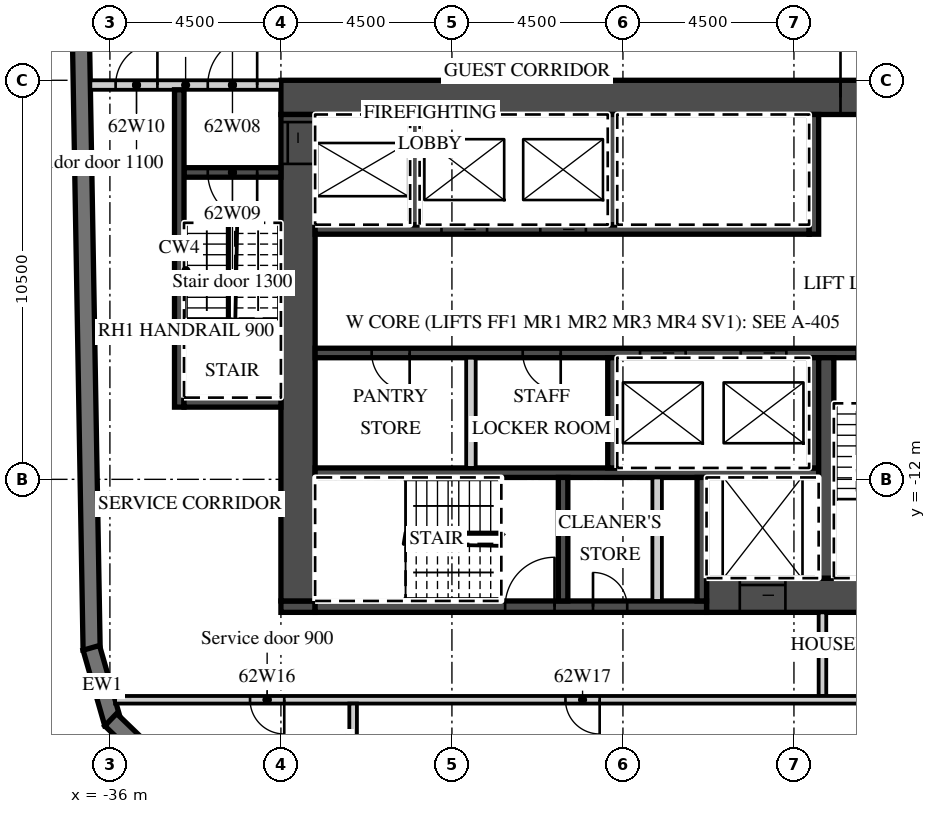
"""IFC4 building model, lengths in metres.
Left out: names, types, materials, properties, quantities, classifications, styles, units other than length and angle.
Written with IfcOpenShell. Run it as: python <this file> out.ifc"""

import sys

from ifc_helpers import new_model, si_unit, direction, frame, frame_2d, origin, place, context, subcontext, project, spatial, polyline, rectangle, outline, extrude, element, fill, save


model = new_model("IFC4")
c1 = context("Model", 3, precision=1e-05, world=origin(), true_north=direction((0.0, 1.0)))
c2 = subcontext(c1, "Body", "Model", "MODEL_VIEW")
j1 = project(units=[si_unit("LENGTHUNIT", "METRE"), si_unit("PLANEANGLEUNIT", "RADIAN")], contexts=[c1])
p1 = place(None, origin())
s1 = spatial("IfcSite", under=j1, at=p1, CompositionType="ELEMENT")
p2 = place(p1, origin())
s2 = spatial("IfcBuilding", under=s1, at=p2, CompositionType="ELEMENT")
p3 = place(p2, frame((0.0, 0.0, 250.7)))
s3 = spatial("IfcBuildingStorey", under=s2, at=p3, CompositionType="ELEMENT", Elevation=250.7)
p4 = place(p3, frame((-37.057, 16.503, 0.0), z_axis=(0.0, 0.0, 1.0), x_axis=(0.017452279857, -0.999847697366, 0.0)))
e1 = element("IfcWall", 1, at=p4, inside=s3, PredefinedType="SOLIDWALL", context=c2, shape_type="SweptSolid", body=[
    extrude(rectangle(XDim=33.0, YDim=0.45, at=frame_2d((16.5, 0.0))), origin(), (0.0, 0.0, 1.0), 3.02),
])
p5 = place(p3, frame((-36.49, -16.434, 0.0), z_axis=(0.0, 0.0, 1.0), x_axis=(0.275577603096, -0.961278827745, 0.0)))
e2 = element("IfcWall", 2, at=p5, inside=s3, PredefinedType="SOLIDWALL", context=c2, shape_type="SweptSolid", body=[
    extrude(outline(polyline([(0.0, -0.225), (2.071, -0.225), (1.95, 0.225), (0.121, 0.225), (0.0, -0.225)])), origin(), (0.0, 0.0, 1.0), 3.02),
])
p6 = place(p3, frame((-35.979, -18.324, 0.0), z_axis=(0.0, 0.0, 1.0), x_axis=(0.719320193998, -0.694678672846, 0.0)))
e3 = element("IfcWall", 3, at=p6, inside=s3, PredefinedType="SOLIDWALL", context=c2, shape_type="SweptSolid", body=[
    extrude(outline(polyline([(0.0, -0.225), (2.071, -0.225), (1.95, 0.225), (0.121, 0.225), (0.0, -0.225)])), origin(), (0.0, 0.0, 1.0), 3.02),
])
p7 = place(p3, frame((-31.5, -1.95, 0.0), z_axis=(0.0, 0.0, 1.0), x_axis=(1.0, 0.0, 0.0)))
e4 = element("IfcWall", 4, at=p7, inside=s3, PredefinedType="SHEAR", context=c2, shape_type="SweptSolid", body=[
    extrude(rectangle(XDim=18.0, YDim=0.9, at=frame_2d((9.0, 0.0))), origin(), (0.0, 0.0, 1.0), 3.02),
])
p8 = place(p7, frame((14.725, 0.0, 0.0)))
e5 = element("IfcOpeningElement", 5, at=p8, cuts=e4, PredefinedType="OPENING", context=c2, shape_type="SweptSolid", body=[
    extrude(rectangle(XDim=1.8, YDim=2.1, at=frame_2d((0.9, 1.05))), frame((0.0, 0.46, 0.0), z_axis=(0.0, -1.0, 0.0), x_axis=(1.0, 0.0, 0.0)), (0.0, 0.0, 1.0), 0.92),
])
p9 = place(p3, frame((-20.3, -15.05, 0.0), z_axis=(0.0, 0.0, 1.0), x_axis=(1.0, 0.0, 0.0)))
e6 = element("IfcWall", 6, at=p9, inside=s3, PredefinedType="SHEAR", context=c2, shape_type="SweptSolid", body=[
    extrude(rectangle(XDim=6.8, YDim=0.9, at=frame_2d((3.4, 0.0))), origin(), (0.0, 0.0, 1.0), 3.02),
])
p10 = place(p9, frame((0.875, 0.0, 0.0)))
e7 = element("IfcOpeningElement", 7, at=p10, cuts=e6, PredefinedType="OPENING", context=c2, shape_type="SweptSolid", body=[
    extrude(rectangle(XDim=1.2, YDim=2.1, at=frame_2d((0.6, 1.05))), frame((0.0, 0.46, 0.0), z_axis=(0.0, -1.0, 0.0), x_axis=(1.0, 0.0, 0.0)), (0.0, 0.0, 1.0), 0.92),
])
p11 = place(p3, frame((-31.5, -15.35, 0.0), z_axis=(0.0, 0.0, 1.0), x_axis=(1.0, 0.0, 0.0)))
e8 = element("IfcWall", 8, at=p11, inside=s3, PredefinedType="SHEAR", context=c2, shape_type="SweptSolid", body=[
    extrude(rectangle(XDim=0.9, YDim=0.3, at=frame_2d((0.45, 0.0))), origin(), (0.0, 0.0, 1.0), 3.02),
])
p12 = place(p3, frame((-30.6, -15.35, 0.0), z_axis=(0.0, 0.0, 1.0), x_axis=(1.0, 0.0, 0.0)))
e9 = element("IfcWall", 9, at=p12, inside=s3, PredefinedType="SHEAR", context=c2, shape_type="SweptSolid", body=[
    extrude(rectangle(XDim=10.3, YDim=0.3, at=frame_2d((5.15, 0.0))), origin(), (0.0, 0.0, 1.0), 3.02),
])
p13 = place(p12, frame((5.0, 0.0, 0.0)))
e10 = element("IfcOpeningElement", 10, at=p13, cuts=e9, PredefinedType="OPENING", context=c2, shape_type="SweptSolid", body=[
    extrude(rectangle(XDim=1.3, YDim=2.1, at=frame_2d((0.65, 1.05))), frame((0.0, 0.16, 0.0), z_axis=(0.0, -1.0, 0.0), x_axis=(1.0, 0.0, 0.0)), (0.0, 0.0, 1.0), 0.32),
])
p14 = place(p12, frame((7.312, 0.0, 0.0)))
e11 = element("IfcOpeningElement", 11, at=p14, cuts=e9, PredefinedType="OPENING", context=c2, shape_type="SweptSolid", body=[
    extrude(rectangle(XDim=0.9, YDim=2.1, at=frame_2d((0.45, 1.05))), frame((0.0, 0.16, 0.0), z_axis=(0.0, -1.0, 0.0), x_axis=(1.0, 0.0, 0.0)), (0.0, 0.0, 1.0), 0.32),
])
p15 = place(p3, frame((-31.05, -15.2, 0.0), z_axis=(0.0, 0.0, 1.0), x_axis=(0.0, 1.0, 0.0)))
e12 = element("IfcWall", 12, at=p15, inside=s3, PredefinedType="SHEAR", context=c2, shape_type="SweptSolid", body=[
    extrude(rectangle(XDim=12.8, YDim=0.9, at=frame_2d((6.4, 0.0))), origin(), (0.0, 0.0, 1.0), 3.02),
])
p16 = place(p15, frame((11.5, 0.0, 0.0)))
e13 = element("IfcOpeningElement", 13, at=p16, cuts=e12, PredefinedType="OPENING", context=c2, shape_type="SweptSolid", body=[
    extrude(rectangle(XDim=1.1, YDim=2.1, at=frame_2d((0.55, 1.05))), frame((0.0, 0.46, 0.0), z_axis=(0.0, -1.0, 0.0), x_axis=(1.0, 0.0, 0.0)), (0.0, 0.0, 1.0), 0.92),
])
p17 = place(p3, frame((-30.6, -5.425, 0.0), z_axis=(0.0, 0.0, 1.0), x_axis=(1.0, 0.0, 0.0)))
e14 = element("IfcWall", 14, at=p17, inside=s3, PredefinedType="SHEAR", context=c2, shape_type="SweptSolid", body=[
    extrude(rectangle(XDim=13.0, YDim=0.25, at=frame_2d((6.5, 0.0))), origin(), (0.0, 0.0, 1.0), 3.02),
])
p18 = place(p17, frame((3.325, 0.0, 0.0)))
e15 = element("IfcOpeningElement", 15, at=p18, cuts=e14, PredefinedType="OPENING", context=c2, shape_type="SweptSolid", body=[
    extrude(rectangle(XDim=1.2, YDim=2.1, at=frame_2d((0.6, 1.05))), frame((0.0, 0.135, 0.0), z_axis=(0.0, -1.0, 0.0), x_axis=(1.0, 0.0, 0.0)), (0.0, 0.0, 1.0), 0.27),
])
p19 = place(p17, frame((5.925, 0.0, 0.0)))
e16 = element("IfcOpeningElement", 16, at=p19, cuts=e14, PredefinedType="OPENING", context=c2, shape_type="SweptSolid", body=[
    extrude(rectangle(XDim=1.2, YDim=2.1, at=frame_2d((0.6, 1.05))), frame((0.0, 0.135, 0.0), z_axis=(0.0, -1.0, 0.0), x_axis=(1.0, 0.0, 0.0)), (0.0, 0.0, 1.0), 0.27),
])
p20 = place(p3, frame((-17.475, -5.55, 0.0), z_axis=(0.0, 0.0, 1.0), x_axis=(0.0, 1.0, 0.0)))
e17 = element("IfcWall", 17, at=p20, inside=s3, PredefinedType="SHEAR", context=c2, shape_type="SweptSolid", body=[
    extrude(rectangle(XDim=3.15, YDim=0.25, at=frame_2d((1.575, 0.0))), origin(), (0.0, 0.0, 1.0), 3.02),
])
for number, where, z_axis, x_axis in (
    (18, (-27.975, -5.3, 0.0), (0.0, 0.0, 1.0), (0.0, 1.0, 0.0)),
    (19, (-22.775, -5.3, 0.0), (0.0, 0.0, 1.0), (0.0, 1.0, 0.0)),
):
    element("IfcWall", number, at=place(p3, frame(where, z_axis=z_axis, x_axis=x_axis)), inside=s3, PredefinedType="SHEAR", context=c2, shape_type="SweptSolid", body=[
        extrude(rectangle(XDim=2.9, YDim=0.25, at=frame_2d((1.45, 0.0))), origin(), (0.0, 0.0, 1.0), 3.02),
    ])
p21 = place(p3, frame((-30.6, -8.675, 0.0), z_axis=(0.0, 0.0, 1.0), x_axis=(1.0, 0.0, 0.0)))
e20 = element("IfcWall", 20, at=p21, inside=s3, PredefinedType="SHEAR", context=c2, shape_type="SweptSolid", body=[
    extrude(rectangle(XDim=16.2, YDim=0.25, at=frame_2d((8.1, 0.0))), origin(), (0.0, 0.0, 1.0), 3.02),
])
p22 = place(p21, frame((8.55, 0.0, 0.0)))
e21 = element("IfcOpeningElement", 21, at=p22, cuts=e20, PredefinedType="OPENING", context=c2, shape_type="SweptSolid", body=[
    extrude(rectangle(XDim=1.2, YDim=2.1, at=frame_2d((0.6, 1.05))), frame((0.0, 0.135, 0.0), z_axis=(0.0, -1.0, 0.0), x_axis=(1.0, 0.0, 0.0)), (0.0, 0.0, 1.0), 0.27),
])
p23 = place(p21, frame((11.2, 0.0, 0.0)))
e22 = element("IfcOpeningElement", 22, at=p23, cuts=e20, PredefinedType="OPENING", context=c2, shape_type="SweptSolid", body=[
    extrude(rectangle(XDim=1.2, YDim=2.1, at=frame_2d((0.6, 1.05))), frame((0.0, 0.135, 0.0), z_axis=(0.0, -1.0, 0.0), x_axis=(1.0, 0.0, 0.0)), (0.0, 0.0, 1.0), 0.27),
])
p24 = place(p21, frame((14.25, 0.0, 0.0)))
e23 = element("IfcOpeningElement", 23, at=p24, cuts=e20, PredefinedType="OPENING", context=c2, shape_type="SweptSolid", body=[
    extrude(rectangle(XDim=1.3, YDim=2.1, at=frame_2d((0.65, 1.05))), frame((0.0, 0.135, 0.0), z_axis=(0.0, -1.0, 0.0), x_axis=(1.0, 0.0, 0.0)), (0.0, 0.0, 1.0), 0.27),
])
p25 = place(p21, frame((1.488, 0.0, 0.0)))
e24 = element("IfcOpeningElement", 24, at=p25, cuts=e20, PredefinedType="OPENING", context=c2, shape_type="SweptSolid", body=[
    extrude(rectangle(XDim=1.0, YDim=2.1, at=frame_2d((0.5, 1.05))), frame((0.0, 0.135, 0.0), z_axis=(0.0, -1.0, 0.0), x_axis=(1.0, 0.0, 0.0)), (0.0, 0.0, 1.0), 0.27),
])
p26 = place(p21, frame((5.462, 0.0, 0.0)))
e25 = element("IfcOpeningElement", 25, at=p26, cuts=e20, PredefinedType="OPENING", context=c2, shape_type="SweptSolid", body=[
    extrude(rectangle(XDim=1.0, YDim=2.1, at=frame_2d((0.5, 1.05))), frame((0.0, 0.135, 0.0), z_axis=(0.0, -1.0, 0.0), x_axis=(1.0, 0.0, 0.0)), (0.0, 0.0, 1.0), 0.27),
])
p27 = place(p3, frame((-30.6, -11.825, 0.0), z_axis=(0.0, 0.0, 1.0), x_axis=(1.0, 0.0, 0.0)))
e26 = element("IfcWall", 26, at=p27, inside=s3, PredefinedType="SHEAR", context=c2, shape_type="SweptSolid", body=[
    extrude(rectangle(XDim=13.25, YDim=0.25, at=frame_2d((6.625, 0.0))), origin(), (0.0, 0.0, 1.0), 3.02),
])
for number, where, z_axis, x_axis in (
    (27, (-17.475, -11.7, 0.0), (0.0, 0.0, 1.0), (0.0, 1.0, 0.0)),
    (28, (-22.775, -11.7, 0.0), (0.0, 0.0, 1.0), (0.0, 1.0, 0.0)),
):
    element("IfcWall", number, at=place(p3, frame(where, z_axis=z_axis, x_axis=x_axis)), inside=s3, PredefinedType="SHEAR", context=c2, shape_type="SweptSolid", body=[
        extrude(rectangle(XDim=2.9, YDim=0.25, at=frame_2d((1.45, 0.0))), origin(), (0.0, 0.0, 1.0), 3.02),
    ])
p28 = place(p3, frame((-26.5, -11.7, 0.0), z_axis=(0.0, 0.0, 1.0), x_axis=(0.0, 1.0, 0.0)))
e29 = element("IfcWall", 29, at=p28, inside=s3, PredefinedType="PARTITIONING", context=c2, shape_type="SweptSolid", body=[
    extrude(rectangle(XDim=2.9, YDim=0.25, at=frame_2d((1.45, 0.0))), origin(), (0.0, 0.0, 1.0), 3.02),
])
p29 = place(p3, frame((-17.15, -14.6, 0.0), z_axis=(0.0, 0.0, 1.0), x_axis=(0.0, 1.0, 0.0)))
e30 = element("IfcWall", 30, at=p29, inside=s3, PredefinedType="SHEAR", context=c2, shape_type="SweptSolid", body=[
    extrude(rectangle(XDim=5.8, YDim=0.4, at=frame_2d((2.9, 0.0))), origin(), (0.0, 0.0, 1.0), 3.02),
])
for number, where, z_axis, x_axis in (
    (31, (-20.425, -15.2, 0.0), (0.0, 0.0, 1.0), (0.0, 1.0, 0.0)),
    (32, (-24.075, -15.2, 0.0), (0.0, 0.0, 1.0), (0.0, 1.0, 0.0)),
):
    element("IfcWall", number, at=place(p3, frame(where, z_axis=z_axis, x_axis=x_axis)), inside=s3, PredefinedType="SHEAR", context=c2, shape_type="SweptSolid", body=[
        extrude(rectangle(XDim=3.25, YDim=0.25, at=frame_2d((1.625, 0.0))), origin(), (0.0, 0.0, 1.0), 3.02),
    ])
p30 = place(p3, frame((-21.6, -15.2, 0.0), z_axis=(0.0, 0.0, 1.0), x_axis=(0.0, 1.0, 0.0)))
e33 = element("IfcWall", 33, at=p30, inside=s3, PredefinedType="PARTITIONING", context=c2, shape_type="SweptSolid", body=[
    extrude(rectangle(XDim=3.25, YDim=0.25, at=frame_2d((1.625, 0.0))), origin(), (0.0, 0.0, 1.0), 3.02),
])
p31 = place(p3, frame((-36.515, -1.625, 0.0), z_axis=(0.0, 0.0, 1.0), x_axis=(1.0, 0.0, 0.0)))
e34 = element("IfcWall", 34, at=p31, inside=s3, PredefinedType="PARTITIONING", context=c2, shape_type="SweptSolid", body=[
    extrude(rectangle(XDim=5.015, YDim=0.25, at=frame_2d((2.508, 0.0))), origin(), (0.0, 0.0, 1.0), 3.02),
])
p32 = place(p31, frame((3.09, 0.0, 0.0)))
e35 = element("IfcOpeningElement", 35, at=p32, cuts=e34, PredefinedType="OPENING", context=c2, shape_type="SweptSolid", body=[
    extrude(rectangle(XDim=1.3, YDim=2.1, at=frame_2d((0.65, 1.05))), frame((0.0, 0.135, 0.0), z_axis=(0.0, -1.0, 0.0), x_axis=(1.0, 0.0, 0.0)), (0.0, 0.0, 1.0), 0.27),
])
p33 = place(p31, frame((0.665, 0.0, 0.0)))
e36 = element("IfcOpeningElement", 36, at=p33, cuts=e34, PredefinedType="OPENING", context=c2, shape_type="SweptSolid", body=[
    extrude(rectangle(XDim=1.1, YDim=2.1, at=frame_2d((0.55, 1.05))), frame((0.0, 0.135, 0.0), z_axis=(0.0, -1.0, 0.0), x_axis=(1.0, 0.0, 0.0)), (0.0, 0.0, 1.0), 0.27),
])
p34 = place(p3, frame((-34.05, -3.925, 0.0), z_axis=(0.0, 0.0, 1.0), x_axis=(1.0, 0.0, 0.0)))
e37 = element("IfcWall", 37, at=p34, inside=s3, PredefinedType="SHEAR", context=c2, shape_type="SweptSolid", body=[
    extrude(rectangle(XDim=2.55, YDim=0.25, at=frame_2d((1.275, 0.0))), origin(), (0.0, 0.0, 1.0), 3.02),
])
p35 = place(p34, frame((0.625, 0.0, 0.0)))
e38 = element("IfcOpeningElement", 38, at=p35, cuts=e37, PredefinedType="OPENING", context=c2, shape_type="SweptSolid", body=[
    extrude(rectangle(XDim=1.3, YDim=2.1, at=frame_2d((0.65, 1.05))), frame((0.0, 0.135, 0.0), z_axis=(0.0, -1.0, 0.0), x_axis=(1.0, 0.0, 0.0)), (0.0, 0.0, 1.0), 0.27),
])
p36 = place(p3, frame((-34.175, -10.1, 0.0), z_axis=(0.0, 0.0, 1.0), x_axis=(0.0, 1.0, 0.0)))
e39 = element("IfcWall", 39, at=p36, inside=s3, PredefinedType="SHEAR", context=c2, shape_type="SweptSolid", body=[
    extrude(rectangle(XDim=8.35, YDim=0.25, at=frame_2d((4.175, 0.0))), origin(), (0.0, 0.0, 1.0), 3.02),
])
p37 = place(p3, frame((-34.05, -9.975, 0.0), z_axis=(0.0, 0.0, 1.0), x_axis=(1.0, 0.0, 0.0)))
e40 = element("IfcWall", 40, at=p37, inside=s3, PredefinedType="SHEAR", context=c2, shape_type="SweptSolid", body=[
    extrude(rectangle(XDim=2.55, YDim=0.25, at=frame_2d((1.275, 0.0))), origin(), (0.0, 0.0, 1.0), 3.02),
])
p38 = place(p3, frame((-17.25, -17.7, 0.0), z_axis=(0.0, 0.0, 1.0), x_axis=(0.0, 1.0, 0.0)))
e41 = element("IfcWall", 41, at=p38, inside=s3, PredefinedType="PARTITIONING", context=c2, shape_type="SweptSolid", body=[
    extrude(rectangle(XDim=2.2, YDim=0.2, at=frame_2d((1.1, 0.0))), origin(), (0.0, 0.0, 1.0), 3.02),
])
p39 = place(p3, frame((-35.864, -17.8, 0.0), z_axis=(0.0, 0.0, 1.0), x_axis=(1.0, 0.0, 0.0)))
e42 = element("IfcWall", 42, at=p39, inside=s3, PredefinedType="PARTITIONING", context=c2, shape_type="SweptSolid", body=[
    extrude(rectangle(XDim=22.264, YDim=0.2, at=frame_2d((11.132, 0.0))), origin(), (0.0, 0.0, 1.0), 3.02),
])
p40 = place(p39, frame((3.551, 0.0, 0.0)))
e43 = element("IfcOpeningElement", 43, at=p40, cuts=e42, PredefinedType="OPENING", context=c2, shape_type="SweptSolid", body=[
    extrude(rectangle(XDim=0.9, YDim=2.1, at=frame_2d((0.45, 1.05))), frame((0.0, 0.11, 0.0), z_axis=(0.0, -1.0, 0.0), x_axis=(1.0, 0.0, 0.0)), (0.0, 0.0, 1.0), 0.22),
])
p41 = place(p39, frame((11.851, 0.0, 0.0)))
e44 = element("IfcOpeningElement", 44, at=p41, cuts=e42, PredefinedType="OPENING", context=c2, shape_type="SweptSolid", body=[
    extrude(rectangle(XDim=0.9, YDim=2.1, at=frame_2d((0.45, 1.05))), frame((0.0, 0.11, 0.0), z_axis=(0.0, -1.0, 0.0), x_axis=(1.0, 0.0, 0.0)), (0.0, 0.0, 1.0), 0.22),
])
p42 = place(p3, frame((-29.6, -19.922, 0.0), z_axis=(0.0, 0.0, 1.0), x_axis=(0.0, 1.0, 0.0)))
e45 = element("IfcWall", 45, at=p42, inside=s3, PredefinedType="PARTITIONING", context=c2, shape_type="SweptSolid", body=[
    extrude(rectangle(XDim=2.022, YDim=0.2, at=frame_2d((1.011, 0.0))), origin(), (0.0, 0.0, 1.0), 3.02),
])
p43 = place(p22, origin())
e46 = element("IfcDoor", 46, at=p43, inside=s3, OperationType="SLIDING_TO_LEFT", PredefinedType="DOOR", context=c2, shape_type="SweptSolid", body=[
    extrude(rectangle(XDim=1.2, YDim=2.1, at=frame_2d((0.6, 1.05))), frame((0.0, 0.025, 0.0), z_axis=(0.0, -1.0, 0.0), x_axis=(1.0, 0.0, 0.0)), (0.0, 0.0, 1.0), 0.05),
])
fill(e21, e46)
p44 = place(p23, origin())
e47 = element("IfcDoor", 47, at=p44, inside=s3, OperationType="SLIDING_TO_RIGHT", PredefinedType="DOOR", context=c2, shape_type="SweptSolid", body=[
    extrude(rectangle(XDim=1.2, YDim=2.1, at=frame_2d((0.6, 1.05))), frame((0.0, 0.025, 0.0), z_axis=(0.0, -1.0, 0.0), x_axis=(1.0, 0.0, 0.0)), (0.0, 0.0, 1.0), 0.05),
])
fill(e22, e47)
p45 = place(p18, origin())
e48 = element("IfcDoor", 48, at=p45, inside=s3, OperationType="SLIDING_TO_RIGHT", PredefinedType="DOOR", context=c2, shape_type="SweptSolid", body=[
    extrude(rectangle(XDim=1.2, YDim=2.1, at=frame_2d((0.6, 1.05))), frame((0.0, 0.025, 0.0), z_axis=(0.0, -1.0, 0.0), x_axis=(1.0, 0.0, 0.0)), (0.0, 0.0, 1.0), 0.05),
])
fill(e15, e48)
p46 = place(p19, origin())
e49 = element("IfcDoor", 49, at=p46, inside=s3, OperationType="SLIDING_TO_RIGHT", PredefinedType="DOOR", context=c2, shape_type="SweptSolid", body=[
    extrude(rectangle(XDim=1.2, YDim=2.1, at=frame_2d((0.6, 1.05))), frame((0.0, 0.025, 0.0), z_axis=(0.0, -1.0, 0.0), x_axis=(1.0, 0.0, 0.0)), (0.0, 0.0, 1.0), 0.05),
])
fill(e16, e49)
p47 = place(p10, origin())
e50 = element("IfcDoor", 50, at=p47, inside=s3, OperationType="SLIDING_TO_LEFT", PredefinedType="DOOR", context=c2, shape_type="SweptSolid", body=[
    extrude(rectangle(XDim=1.2, YDim=2.1, at=frame_2d((0.6, 1.05))), frame((0.0, 0.025, 0.0), z_axis=(0.0, -1.0, 0.0), x_axis=(1.0, 0.0, 0.0)), (0.0, 0.0, 1.0), 0.05),
])
fill(e7, e50)
p48 = place(p16, origin())
e51 = element("IfcDoor", 51, at=p48, inside=s3, OperationType="SLIDING_TO_RIGHT", PredefinedType="DOOR", context=c2, shape_type="SweptSolid", body=[
    extrude(rectangle(XDim=1.1, YDim=2.1, at=frame_2d((0.55, 1.05))), frame((0.0, 0.025, 0.0), z_axis=(0.0, -1.0, 0.0), x_axis=(1.0, 0.0, 0.0)), (0.0, 0.0, 1.0), 0.05),
])
fill(e13, e51)
p49 = place(p8, origin())
e52 = element("IfcDoor", 52, at=p49, inside=s3, OperationType="DOUBLE_DOOR_DOUBLE_SWING", PredefinedType="DOOR", context=c2, shape_type="SweptSolid", body=[
    extrude(rectangle(XDim=1.8, YDim=2.1, at=frame_2d((0.9, 1.05))), frame((0.0, 0.025, 0.0), z_axis=(0.0, -1.0, 0.0), x_axis=(1.0, 0.0, 0.0)), (0.0, 0.0, 1.0), 0.05),
])
fill(e5, e52)
p50 = place(p32, origin())
e53 = element("IfcDoor", 53, at=p50, inside=s3, OperationType="SINGLE_SWING_RIGHT", PredefinedType="DOOR", context=c2, shape_type="SweptSolid", body=[
    extrude(rectangle(XDim=1.3, YDim=2.1, at=frame_2d((0.65, 1.05))), frame((0.0, 0.025, 0.0), z_axis=(0.0, -1.0, 0.0), x_axis=(1.0, 0.0, 0.0)), (0.0, 0.0, 1.0), 0.05),
])
fill(e35, e53)
p51 = place(p35, origin())
e54 = element("IfcDoor", 54, at=p51, inside=s3, OperationType="SINGLE_SWING_RIGHT", PredefinedType="DOOR", context=c2, shape_type="SweptSolid", body=[
    extrude(rectangle(XDim=1.3, YDim=2.1, at=frame_2d((0.65, 1.05))), frame((0.0, 0.025, 0.0), z_axis=(0.0, -1.0, 0.0), x_axis=(1.0, 0.0, 0.0)), (0.0, 0.0, 1.0), 0.05),
])
fill(e38, e54)
p52 = place(p33, origin())
e55 = element("IfcDoor", 55, at=p52, inside=s3, OperationType="SINGLE_SWING_RIGHT", PredefinedType="DOOR", context=c2, shape_type="SweptSolid", body=[
    extrude(rectangle(XDim=1.1, YDim=2.1, at=frame_2d((0.55, 1.05))), frame((0.0, 0.025, 0.0), z_axis=(0.0, -1.0, 0.0), x_axis=(1.0, 0.0, 0.0)), (0.0, 0.0, 1.0), 0.05),
])
fill(e36, e55)
p53 = place(p24, origin())
e56 = element("IfcDoor", 56, at=p53, inside=s3, OperationType="SINGLE_SWING_RIGHT", PredefinedType="DOOR", context=c2, shape_type="SweptSolid", body=[
    extrude(rectangle(XDim=1.3, YDim=2.1, at=frame_2d((0.65, 1.05))), frame((0.0, 0.025, 0.0), z_axis=(0.0, -1.0, 0.0), x_axis=(1.0, 0.0, 0.0)), (0.0, 0.0, 1.0), 0.05),
])
fill(e23, e56)
p54 = place(p13, origin())
e57 = element("IfcDoor", 57, at=p54, inside=s3, OperationType="SINGLE_SWING_RIGHT", PredefinedType="DOOR", context=c2, shape_type="SweptSolid", body=[
    extrude(rectangle(XDim=1.3, YDim=2.1, at=frame_2d((0.65, 1.05))), frame((0.0, 0.025, 0.0), z_axis=(0.0, -1.0, 0.0), x_axis=(1.0, 0.0, 0.0)), (0.0, 0.0, 1.0), 0.05),
])
fill(e10, e57)
p55 = place(p14, origin())
e58 = element("IfcDoor", 58, at=p55, inside=s3, OperationType="SINGLE_SWING_LEFT", PredefinedType="DOOR", context=c2, shape_type="SweptSolid", body=[
    extrude(rectangle(XDim=0.9, YDim=2.1, at=frame_2d((0.45, 1.05))), frame((0.0, 0.025, 0.0), z_axis=(0.0, -1.0, 0.0), x_axis=(1.0, 0.0, 0.0)), (0.0, 0.0, 1.0), 0.05),
])
fill(e11, e58)
p56 = place(p25, origin())
e59 = element("IfcDoor", 59, at=p56, inside=s3, OperationType="SINGLE_SWING_RIGHT", PredefinedType="DOOR", context=c2, shape_type="SweptSolid", body=[
    extrude(rectangle(XDim=1.0, YDim=2.1, at=frame_2d((0.5, 1.05))), frame((0.0, 0.025, 0.0), z_axis=(0.0, -1.0, 0.0), x_axis=(1.0, 0.0, 0.0)), (0.0, 0.0, 1.0), 0.05),
])
fill(e24, e59)
p57 = place(p26, origin())
e60 = element("IfcDoor", 60, at=p57, inside=s3, OperationType="SINGLE_SWING_RIGHT", PredefinedType="DOOR", context=c2, shape_type="SweptSolid", body=[
    extrude(rectangle(XDim=1.0, YDim=2.1, at=frame_2d((0.5, 1.05))), frame((0.0, 0.025, 0.0), z_axis=(0.0, -1.0, 0.0), x_axis=(1.0, 0.0, 0.0)), (0.0, 0.0, 1.0), 0.05),
])
fill(e25, e60)
p58 = place(p40, origin())
e61 = element("IfcDoor", 61, at=p58, inside=s3, OperationType="SINGLE_SWING_RIGHT", PredefinedType="DOOR", context=c2, shape_type="SweptSolid", body=[
    extrude(rectangle(XDim=0.9, YDim=2.1, at=frame_2d((0.45, 1.05))), frame((0.0, 0.025, 0.0), z_axis=(0.0, -1.0, 0.0), x_axis=(1.0, 0.0, 0.0)), (0.0, 0.0, 1.0), 0.05),
])
fill(e43, e61)
p59 = place(p41, origin())
e62 = element("IfcDoor", 62, at=p59, inside=s3, OperationType="SINGLE_SWING_RIGHT", PredefinedType="DOOR", context=c2, shape_type="SweptSolid", body=[
    extrude(rectangle(XDim=0.9, YDim=2.1, at=frame_2d((0.45, 1.05))), frame((0.0, 0.025, 0.0), z_axis=(0.0, -1.0, 0.0), x_axis=(1.0, 0.0, 0.0)), (0.0, 0.0, 1.0), 0.05),
])
fill(e44, e62)
save(model, sys.argv[1])
